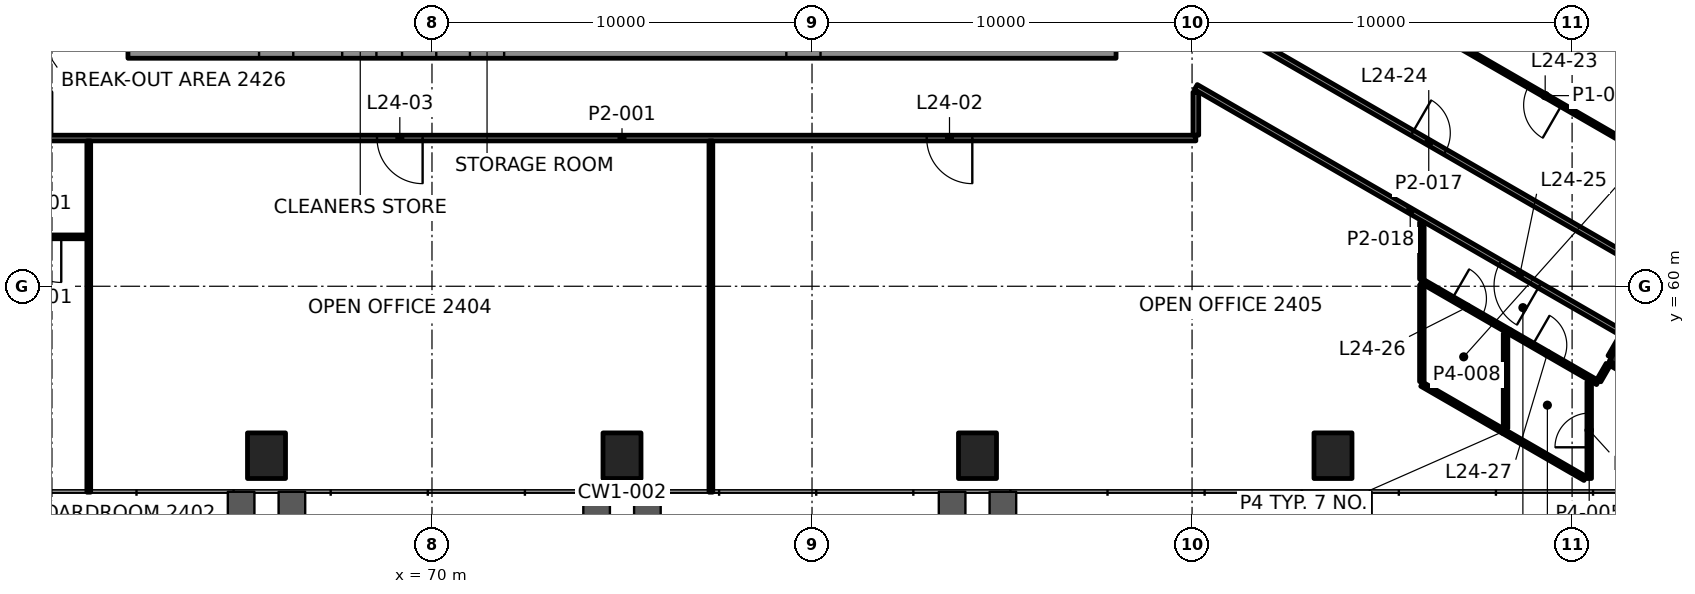
"""IFC4 building model, lengths in metres.
Left out: names, types, materials, properties, quantities, classifications, styles, units other than length and angle.
Written with IfcOpenShell. Run it as: python <this file> out.ifc"""

import sys

from ifc_helpers import new_model, si_unit, direction, frame, frame_2d, origin, origin_2d, place, context, subcontext, project, spatial, rectangle, extrude, element, fill, save


model = new_model("IFC4")
c1 = context("Model", 3, precision=1e-05, world=origin(), true_north=direction((0.0, 1.0)))
c2 = subcontext(c1, "Body", "Model", "MODEL_VIEW")
j1 = project(units=[si_unit("LENGTHUNIT", "METRE"), si_unit("PLANEANGLEUNIT", "RADIAN")], contexts=[c1])
p1 = place(None, origin())
s1 = spatial("IfcSite", under=j1, at=p1, CompositionType="ELEMENT")
p2 = place(p1, origin())
s2 = spatial("IfcBuilding", under=s1, at=p2, CompositionType="ELEMENT")
p3 = place(p2, frame((0.0, 0.0, 107.2)))
s3 = spatial("IfcBuildingStorey", under=s2, at=p3, CompositionType="ELEMENT", Elevation=107.2)
p4 = place(p3, frame((103.304, 58.659, 0.0), z_axis=(0.0, 0.0, 1.0), x_axis=(0.5, 0.866025403784, 0.0)))
e1 = element("IfcColumn", 1, at=p4, inside=s3, PredefinedType="COLUMN", context=c2, shape_type="SweptSolid", body=[
    extrude(rectangle(XDim=3.4, YDim=3.4, at=origin_2d()), origin(), (0.0, 0.0, 1.0), 4.2),
])
for number, where, z_axis, x_axis in (
    (2, (65.646, 55.541, -0.0), (0.0, 0.0, 1.0), (1.0, 0.0, 0.0)),
    (3, (75.0, 55.541, -0.0), (0.0, 0.0, 1.0), (1.0, 0.0, 0.0)),
    (4, (84.354, 55.541, -0.0), (0.0, 0.0, 1.0), (1.0, 0.0, 0.0)),
    (5, (93.708, 55.541, -0.0), (0.0, 0.0, 1.0), (1.0, 0.0, 0.0)),
):
    element("IfcColumn", number, at=place(p3, frame(where, z_axis=z_axis, x_axis=x_axis)), inside=s3, PredefinedType="COLUMN", context=c2, shape_type="SweptSolid", body=[
        extrude(rectangle(XDim=1.0, YDim=1.2, at=origin_2d()), origin(), (0.0, 0.0, 1.0), 4.2),
    ])
p5 = place(p3, frame((62.0, 66.45, 0.0), z_axis=(0.0, 0.0, 1.0), x_axis=(1.0, 0.0, 0.0)))
e6 = element("IfcWall", 6, at=p5, inside=s3, PredefinedType="SHEAR", context=c2, shape_type="SweptSolid", body=[
    extrude(rectangle(XDim=26.0, YDim=0.9, at=frame_2d((13.0, 0.0))), origin(), (0.0, 0.0, 1.0), 4.0),
])
p6 = place(p5, frame((3.45, 0.0, 0.0)))
e7 = element("IfcOpeningElement", 7, at=p6, cuts=e6, PredefinedType="OPENING", context=c2, shape_type="SweptSolid", body=[
    extrude(rectangle(XDim=0.9, YDim=2.1, at=frame_2d((0.45, 1.05))), frame((0.0, 0.46, 0.0), z_axis=(0.0, -1.0, 0.0), x_axis=(1.0, 0.0, 0.0)), (0.0, 0.0, 1.0), 0.92),
])
p7 = place(p5, frame((5.637, 0.0, 0.0)))
e8 = element("IfcOpeningElement", 8, at=p7, cuts=e6, PredefinedType="OPENING", context=c2, shape_type="SweptSolid", body=[
    extrude(rectangle(XDim=0.9, YDim=2.1, at=frame_2d((0.45, 1.05))), frame((0.0, 0.46, 0.0), z_axis=(0.0, -1.0, 0.0), x_axis=(1.0, 0.0, 0.0)), (0.0, 0.0, 1.0), 0.92),
])
p8 = place(p5, frame((7.212, 0.0, 0.0)))
e9 = element("IfcOpeningElement", 9, at=p8, cuts=e6, PredefinedType="OPENING", context=c2, shape_type="SweptSolid", body=[
    extrude(rectangle(XDim=0.9, YDim=2.1, at=frame_2d((0.45, 1.05))), frame((0.0, 0.46, 0.0), z_axis=(0.0, -1.0, 0.0), x_axis=(1.0, 0.0, 0.0)), (0.0, 0.0, 1.0), 0.92),
])
p9 = place(p5, frame((8.999, 0.0, 0.0)))
e10 = element("IfcOpeningElement", 10, at=p9, cuts=e6, PredefinedType="OPENING", context=c2, shape_type="SweptSolid", body=[
    extrude(rectangle(XDim=0.9, YDim=2.1, at=frame_2d((0.45, 1.05))), frame((0.0, 0.46, 0.0), z_axis=(0.0, -1.0, 0.0), x_axis=(1.0, 0.0, 0.0)), (0.0, 0.0, 1.0), 0.92),
])
p10 = place(p5, frame((17.324, 0.0, 0.0)))
e11 = element("IfcOpeningElement", 11, at=p10, cuts=e6, PredefinedType="OPENING", context=c2, shape_type="SweptSolid", body=[
    extrude(rectangle(XDim=0.9, YDim=2.1, at=frame_2d((0.45, 1.05))), frame((0.0, 0.46, 0.0), z_axis=(0.0, -1.0, 0.0), x_axis=(1.0, 0.0, 0.0)), (0.0, 0.0, 1.0), 0.92),
])
p11 = place(p3, frame((60.919, 61.3, 0.0), z_axis=(0.0, 0.0, 1.0), x_axis=(-1.0, 0.0, 0.0)))
e12 = element("IfcWall", 12, at=p11, inside=s3, PredefinedType="PARTITIONING", context=c2, shape_type="SweptSolid", body=[
    extrude(rectangle(XDim=2.548, YDim=0.1, at=frame_2d((1.274, 0.0))), origin(), (0.0, 0.0, 1.0), 3.4),
])
p12 = place(p11, frame((0.674, 0.0, 0.0)))
e13 = element("IfcOpeningElement", 13, at=p12, cuts=e12, PredefinedType="OPENING", context=c2, shape_type="SweptSolid", body=[
    extrude(rectangle(XDim=1.2, YDim=2.1, at=frame_2d((0.6, 1.05))), frame((0.0, 0.06, 0.0), z_axis=(0.0, -1.0, 0.0), x_axis=(1.0, 0.0, 0.0)), (0.0, 0.0, 1.0), 0.12),
])
p13 = place(p3, frame((90.099, 63.9, 0.0), z_axis=(0.0, 0.0, 1.0), x_axis=(-1.0, 0.0, 0.0)))
e14 = element("IfcWall", 14, at=p13, inside=s3, PredefinedType="PARTITIONING", context=c2, shape_type="SweptSolid", body=[
    extrude(rectangle(XDim=30.199, YDim=0.15, at=frame_2d((15.099, 0.0))), origin(), (0.0, 0.0, 1.0), 3.4),
])
p14 = place(p13, frame((5.882, 0.0, 0.0)))
e15 = element("IfcOpeningElement", 15, at=p14, cuts=e14, PredefinedType="OPENING", context=c2, shape_type="SweptSolid", body=[
    extrude(rectangle(XDim=1.2, YDim=2.1, at=frame_2d((0.6, 1.05))), frame((0.0, 0.085, 0.0), z_axis=(0.0, -1.0, 0.0), x_axis=(1.0, 0.0, 0.0)), (0.0, 0.0, 1.0), 0.17),
])
p15 = place(p13, frame((20.346, 0.0, 0.0)))
e16 = element("IfcOpeningElement", 16, at=p15, cuts=e14, PredefinedType="OPENING", context=c2, shape_type="SweptSolid", body=[
    extrude(rectangle(XDim=1.2, YDim=2.1, at=frame_2d((0.6, 1.05))), frame((0.0, 0.085, 0.0), z_axis=(0.0, -1.0, 0.0), x_axis=(1.0, 0.0, 0.0)), (0.0, 0.0, 1.0), 0.17),
])
p16 = place(p3, frame((100.704, 57.516, 0.0), z_axis=(0.0, 0.0, 1.0), x_axis=(0.499679281737, 0.866210491395, 0.0)))
e17 = element("IfcWall", 17, at=p16, inside=s3, PredefinedType="PARTITIONING", context=c2, shape_type="SweptSolid", body=[
    extrude(rectangle(XDim=0.49, YDim=0.12, at=frame_2d((0.245, 0.0))), origin(), (0.0, 0.0, 1.0), 3.4),
])
p17 = place(p3, frame((101.031, 58.124, 0.0), z_axis=(0.0, 0.0, 1.0), x_axis=(0.500049599607, 0.865996765544, 0.0)))
e18 = element("IfcWall", 18, at=p17, inside=s3, PredefinedType="PARTITIONING", context=c2, shape_type="SweptSolid", body=[
    extrude(rectangle(XDim=0.625, YDim=0.2, at=frame_2d((0.312, 0.0))), origin(), (0.0, 0.0, 1.0), 3.4),
])
p18 = place(p3, frame((100.45, 54.941, 0.0), z_axis=(0.0, 0.0, 1.0), x_axis=(0.0, 1.0, 0.0)))
e19 = element("IfcWall", 19, at=p18, inside=s3, PredefinedType="PARTITIONING", context=c2, shape_type="SweptSolid", body=[
    extrude(rectangle(XDim=2.542, YDim=0.12, at=frame_2d((1.271, 0.0))), origin(), (0.0, 0.0, 1.0), 3.4),
])
p19 = place(p18, frame((0.821, 0.0, 0.0)))
e20 = element("IfcOpeningElement", 20, at=p19, cuts=e19, PredefinedType="OPENING", context=c2, shape_type="SweptSolid", body=[
    extrude(rectangle(XDim=0.9, YDim=2.1, at=frame_2d((0.45, 1.05))), frame((0.0, 0.07, 0.0), z_axis=(0.0, -1.0, 0.0), x_axis=(1.0, 0.0, 0.0)), (0.0, 0.0, 1.0), 0.14),
])
p20 = place(p3, frame((98.249, 56.26, 0.0), z_axis=(0.0, 0.0, 1.0), x_axis=(0.0, 1.0, 0.0)))
e21 = element("IfcWall", 21, at=p20, inside=s3, PredefinedType="PARTITIONING", context=c2, shape_type="SweptSolid", body=[
    extrude(rectangle(XDim=2.495, YDim=0.12, at=frame_2d((1.248, 0.0))), origin(), (0.0, 0.0, 1.0), 3.4),
])
p21 = place(p3, frame((96.047, 57.491, 0.0), z_axis=(0.0, 0.0, 1.0), x_axis=(0.0, 1.0, 0.0)))
e22 = element("IfcWall", 22, at=p21, inside=s3, PredefinedType="PARTITIONING", context=c2, shape_type="SweptSolid", body=[
    extrude(rectangle(XDim=2.541, YDim=0.12, at=frame_2d((1.27, 0.0))), origin(), (0.0, 0.0, 1.0), 3.4),
])
p22 = place(p3, frame((90.1, 63.976, 0.0), z_axis=(0.0, 0.0, 1.0), x_axis=(0.0, 1.0, 0.0)))
e23 = element("IfcWall", 23, at=p22, inside=s3, PredefinedType="PARTITIONING", context=c2, shape_type="SweptSolid", body=[
    extrude(rectangle(XDim=1.131, YDim=0.15, at=frame_2d((0.565, 0.0))), origin(), (0.0, 0.0, 1.0), 3.247),
])
for number, where, z_axis, x_axis in (
    (24, (77.339, 54.581, 0.0), (0.0, 0.0, 1.0), (0.0, 1.0, 0.0)),
    (25, (60.969, 54.581, 0.0), (0.0, 0.0, 1.0), (0.0, 1.0, 0.0)),
):
    element("IfcWall", number, at=place(p3, frame(where, z_axis=z_axis, x_axis=x_axis)), inside=s3, PredefinedType="PARTITIONING", context=c2, shape_type="SweptSolid", body=[
        extrude(rectangle(XDim=9.244, YDim=0.1, at=frame_2d((4.622, 0.0))), origin(), (0.0, 0.0, 1.0), 3.165),
    ])
p23 = place(p3, frame((105.833, 61.24, 0.0), z_axis=(0.0, 0.0, 1.0), x_axis=(-0.866025727262, 0.499999439721, 0.0)))
e26 = element("IfcWall", 26, at=p23, inside=s3, PredefinedType="PARTITIONING", context=c2, shape_type="SweptSolid", body=[
    extrude(rectangle(XDim=15.107, YDim=0.1, at=frame_2d((7.553, 0.0))), origin(), (0.0, 0.0, 1.0), 3.4),
])
p24 = place(p23, frame((7.053, 0.0, 0.0)))
e27 = element("IfcOpeningElement", 27, at=p24, cuts=e26, PredefinedType="OPENING", context=c2, shape_type="SweptSolid", body=[
    extrude(rectangle(XDim=1.0, YDim=2.1, at=frame_2d((0.5, 1.05))), frame((0.0, 0.06, 0.0), z_axis=(0.0, -1.0, 0.0), x_axis=(1.0, 0.0, 0.0)), (0.0, 0.0, 1.0), 0.12),
])
p25 = place(p3, frame((90.175, 67.278, 0.0), z_axis=(0.0, 0.0, 1.0), x_axis=(0.866025916507, -0.499999111938, 0.0)))
e28 = element("IfcWall", 28, at=p25, inside=s3, PredefinedType="PARTITIONING", context=c2, shape_type="SweptSolid", body=[
    extrude(rectangle(XDim=13.979, YDim=0.15, at=frame_2d((6.99, 0.0))), origin(), (0.0, 0.0, 1.0), 3.4),
])
p26 = place(p25, frame((6.49, 0.0, 0.0)))
e29 = element("IfcOpeningElement", 29, at=p26, cuts=e28, PredefinedType="OPENING", context=c2, shape_type="SweptSolid", body=[
    extrude(rectangle(XDim=1.0, YDim=2.1, at=frame_2d((0.5, 1.05))), frame((0.0, 0.085, 0.0), z_axis=(0.0, -1.0, 0.0), x_axis=(1.0, 0.0, 0.0)), (0.0, 0.0, 1.0), 0.17),
])
p27 = place(p3, frame((101.382, 58.729, 0.0), z_axis=(0.0, 0.0, 1.0), x_axis=(-0.866023606965, 0.500003112169, 0.0)))
e30 = element("IfcWall", 30, at=p27, inside=s3, PredefinedType="PARTITIONING", context=c2, shape_type="SweptSolid", body=[
    extrude(rectangle(XDim=13.027, YDim=0.15, at=frame_2d((6.513, 0.0))), origin(), (0.0, 0.0, 1.0), 3.247),
])
p28 = place(p27, frame((2.581, 0.0, 0.0)))
e31 = element("IfcOpeningElement", 31, at=p28, cuts=e30, PredefinedType="OPENING", context=c2, shape_type="SweptSolid", body=[
    extrude(rectangle(XDim=1.2, YDim=2.1, at=frame_2d((0.6, 1.05))), frame((0.0, 0.085, 0.0), z_axis=(0.0, -1.0, 0.0), x_axis=(1.0, 0.0, 0.0)), (0.0, 0.0, 1.0), 0.17),
])
p29 = place(p3, frame((104.065, 56.257, 0.0), z_axis=(0.0, 0.0, 1.0), x_axis=(-0.866034141321, 0.499984865837, 0.0)))
e32 = element("IfcWall", 32, at=p29, inside=s3, PredefinedType="PARTITIONING", context=c2, shape_type="SweptSolid", body=[
    extrude(rectangle(XDim=3.543, YDim=0.2, at=frame_2d((1.772, 0.0))), origin(), (0.0, 0.0, 1.0), 3.4),
])
p30 = place(p3, frame((96.047, 60.135, 0.0), z_axis=(0.0, 0.0, 1.0), x_axis=(0.866018138487, -0.500012583653, 0.0)))
e33 = element("IfcWall", 33, at=p30, inside=s3, PredefinedType="PARTITIONING", context=c2, shape_type="SweptSolid", body=[
    extrude(rectangle(XDim=5.342, YDim=0.12, at=frame_2d((2.671, 0.0))), origin(), (0.0, 0.0, 1.0), 3.4),
])
p31 = place(p30, frame((0.923, 0.0, 0.0)))
e34 = element("IfcOpeningElement", 34, at=p31, cuts=e33, PredefinedType="OPENING", context=c2, shape_type="SweptSolid", body=[
    extrude(rectangle(XDim=0.9, YDim=2.1, at=frame_2d((0.45, 1.05))), frame((0.0, 0.07, 0.0), z_axis=(0.0, -1.0, 0.0), x_axis=(1.0, 0.0, 0.0)), (0.0, 0.0, 1.0), 0.14),
])
p32 = place(p30, frame((3.364, 0.0, 0.0)))
e35 = element("IfcOpeningElement", 35, at=p32, cuts=e33, PredefinedType="OPENING", context=c2, shape_type="SweptSolid", body=[
    extrude(rectangle(XDim=0.9, YDim=2.1, at=frame_2d((0.45, 1.05))), frame((0.0, 0.07, 0.0), z_axis=(0.0, -1.0, 0.0), x_axis=(1.0, 0.0, 0.0)), (0.0, 0.0, 1.0), 0.14),
])
p33 = place(p3, frame((100.343, 54.941, 0.0), z_axis=(0.0, 0.0, 1.0), x_axis=(-0.866005271205, 0.500034869029, 0.0)))
e36 = element("IfcWall", 36, at=p33, inside=s3, PredefinedType="PARTITIONING", context=c2, shape_type="SweptSolid", body=[
    extrude(rectangle(XDim=4.961, YDim=0.12, at=frame_2d((2.48, 0.0))), origin(), (0.0, 0.0, 1.0), 3.4),
])
p34 = place(p3, frame((96.047, 60.187, 0.0), z_axis=(0.0, 0.0, 1.0), x_axis=(0.0, 1.0, 0.0)))
e37 = element("IfcWall", 37, at=p34, inside=s3, PredefinedType="PARTITIONING", context=c2, shape_type="SweptSolid", body=[
    extrude(rectangle(XDim=1.496, YDim=0.12, at=frame_2d((0.748, 0.0))), origin(), (0.0, 0.0, 1.0), 3.4),
])
p35 = place(p12, origin())
e38 = element("IfcDoor", 38, at=p35, inside=s3, OperationType="DOUBLE_DOOR_SINGLE_SWING", PredefinedType="DOOR", context=c2, shape_type="SweptSolid", body=[
    extrude(rectangle(XDim=1.2, YDim=2.1, at=frame_2d((0.6, 1.05))), frame((0.0, 0.025, 0.0), z_axis=(0.0, -1.0, 0.0), x_axis=(1.0, 0.0, 0.0)), (0.0, 0.0, 1.0), 0.05),
])
fill(e13, e38)
p36 = place(p14, origin())
e39 = element("IfcDoor", 39, at=p36, inside=s3, OperationType="DOUBLE_DOOR_SINGLE_SWING", PredefinedType="DOOR", context=c2, shape_type="SweptSolid", body=[
    extrude(rectangle(XDim=1.2, YDim=2.1, at=frame_2d((0.6, 1.05))), frame((0.0, 0.025, 0.0), z_axis=(0.0, -1.0, 0.0), x_axis=(1.0, 0.0, 0.0)), (0.0, 0.0, 1.0), 0.05),
])
fill(e15, e39)
p37 = place(p15, origin())
e40 = element("IfcDoor", 40, at=p37, inside=s3, OperationType="DOUBLE_DOOR_SINGLE_SWING", PredefinedType="DOOR", context=c2, shape_type="SweptSolid", body=[
    extrude(rectangle(XDim=1.2, YDim=2.1, at=frame_2d((0.6, 1.05))), frame((0.0, 0.025, 0.0), z_axis=(0.0, -1.0, 0.0), x_axis=(1.0, 0.0, 0.0)), (0.0, 0.0, 1.0), 0.05),
])
fill(e16, e40)
p38 = place(p19, origin())
e41 = element("IfcDoor", 41, at=p38, inside=s3, OperationType="SINGLE_SWING_RIGHT", PredefinedType="DOOR", context=c2, shape_type="SweptSolid", body=[
    extrude(rectangle(XDim=0.9, YDim=2.1, at=frame_2d((0.45, 1.05))), frame((0.0, 0.025, 0.0), z_axis=(0.0, -1.0, 0.0), x_axis=(1.0, 0.0, 0.0)), (0.0, 0.0, 1.0), 0.05),
])
fill(e20, e41)
p39 = place(p24, origin())
e42 = element("IfcDoor", 42, at=p39, inside=s3, OperationType="SINGLE_SWING_LEFT", PredefinedType="DOOR", context=c2, shape_type="SweptSolid", body=[
    extrude(rectangle(XDim=1.0, YDim=2.1, at=frame_2d((0.5, 1.05))), frame((0.0, 0.025, 0.0), z_axis=(0.0, -1.0, 0.0), x_axis=(1.0, 0.0, 0.0)), (0.0, 0.0, 1.0), 0.05),
])
fill(e27, e42)
p40 = place(p26, origin())
e43 = element("IfcDoor", 43, at=p40, inside=s3, OperationType="SINGLE_SWING_LEFT", PredefinedType="DOOR", context=c2, shape_type="SweptSolid", body=[
    extrude(rectangle(XDim=1.0, YDim=2.1, at=frame_2d((0.5, 1.05))), frame((0.0, 0.025, 0.0), z_axis=(0.0, -1.0, 0.0), x_axis=(1.0, 0.0, 0.0)), (0.0, 0.0, 1.0), 0.05),
])
fill(e29, e43)
p41 = place(p28, origin())
e44 = element("IfcDoor", 44, at=p41, inside=s3, OperationType="DOUBLE_DOOR_SINGLE_SWING", PredefinedType="DOOR", context=c2, shape_type="SweptSolid", body=[
    extrude(rectangle(XDim=1.2, YDim=2.1, at=frame_2d((0.6, 1.05))), frame((0.0, 0.025, 0.0), z_axis=(0.0, -1.0, 0.0), x_axis=(1.0, 0.0, 0.0)), (0.0, 0.0, 1.0), 0.05),
])
fill(e31, e44)
p42 = place(p31, origin())
e45 = element("IfcDoor", 45, at=p42, inside=s3, OperationType="SINGLE_SWING_LEFT", PredefinedType="DOOR", context=c2, shape_type="SweptSolid", body=[
    extrude(rectangle(XDim=0.9, YDim=2.1, at=frame_2d((0.45, 1.05))), frame((0.0, 0.025, 0.0), z_axis=(0.0, -1.0, 0.0), x_axis=(1.0, 0.0, 0.0)), (0.0, 0.0, 1.0), 0.05),
])
fill(e34, e45)
p43 = place(p32, origin())
e46 = element("IfcDoor", 46, at=p43, inside=s3, OperationType="SINGLE_SWING_RIGHT", PredefinedType="DOOR", context=c2, shape_type="SweptSolid", body=[
    extrude(rectangle(XDim=0.9, YDim=2.1, at=frame_2d((0.45, 1.05))), frame((0.0, 0.025, 0.0), z_axis=(0.0, -1.0, 0.0), x_axis=(1.0, 0.0, 0.0)), (0.0, 0.0, 1.0), 0.05),
])
fill(e35, e46)
save(model, sys.argv[1])
